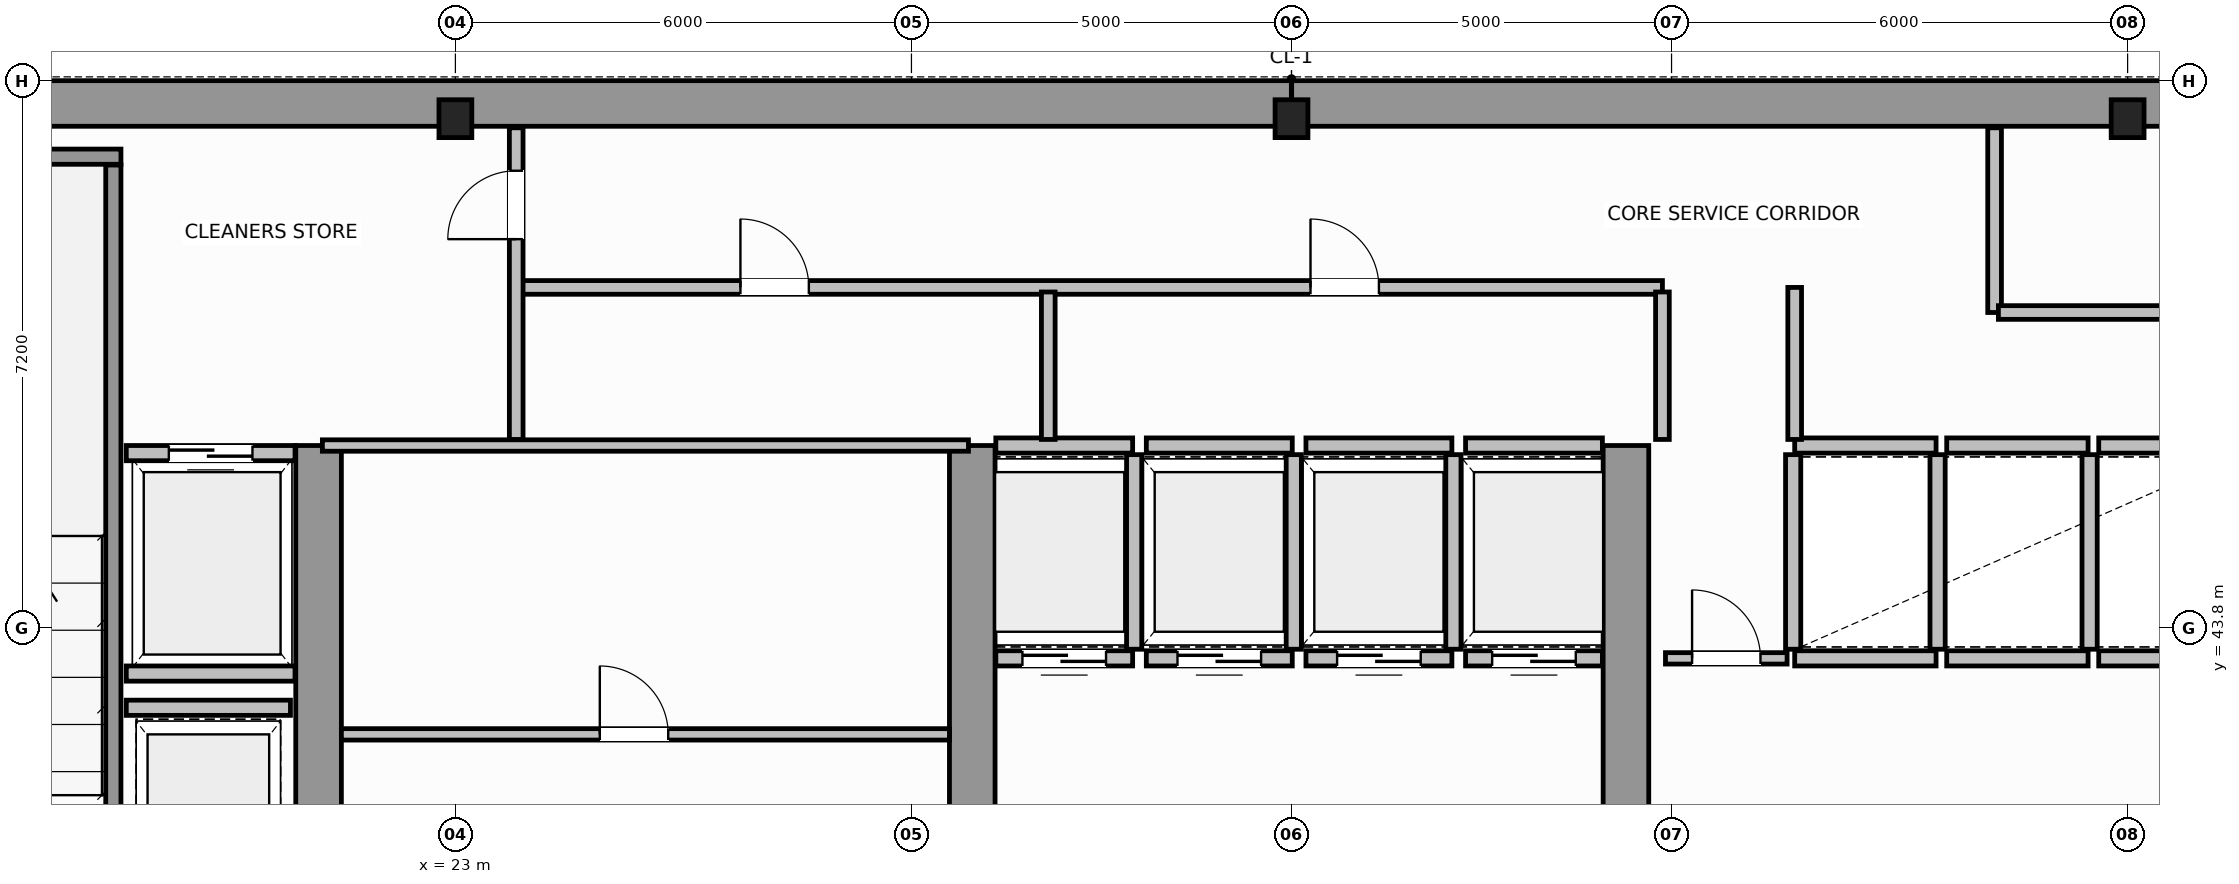
"""IFC4 building model, lengths in metres.
Left out: names, types, materials, properties, quantities, classifications, styles, units other than length and angle.
Written with IfcOpenShell. Run it as: python <this file> out.ifc"""

import sys

from ifc_helpers import new_model, si_unit, direction, frame, frame_2d, origin, origin_2d, place, context, subcontext, project, spatial, rectangle, i_section, extrude, source, transform, mapped, element, fill, save


model = new_model("IFC4")
c1 = context("Model", 3, precision=1e-05, world=origin(), true_north=direction((0.0, 1.0)))
c2 = subcontext(c1, "Body", "Model", "MODEL_VIEW")
j1 = project(units=[si_unit("LENGTHUNIT", "METRE"), si_unit("PLANEANGLEUNIT", "RADIAN")], contexts=[c1])
p1 = place(None, origin())
s1 = spatial("IfcSite", under=j1, at=p1, CompositionType="ELEMENT")
p2 = place(p1, origin())
s2 = spatial("IfcBuilding", under=s1, at=p2, CompositionType="ELEMENT")
p3 = place(p2, frame((0.0, 0.0, 169.0)))
s3 = spatial("IfcBuildingStorey", under=s2, at=p3, CompositionType="ELEMENT", Elevation=169.0)
m1 = source(origin(), c2, "Body", "SweptSolid", [
    extrude(i_section(OverallWidth=0.432, OverallDepth=0.498, WebThickness=0.055, FlangeThickness=0.068, FilletRadius=0.015, at=origin_2d()), origin(), (0.0, 0.0, 1.0), 3.8),
])
for number, where, z_axis, x_axis in (
    (1, (23.0, 50.5, 0.0), (0.0, 0.0, 1.0), (1.0, 0.0, 0.0)),
    (2, (34.0, 50.5, 0.0), (0.0, 0.0, 1.0), (1.0, 0.0, 0.0)),
    (3, (45.0, 50.5, 0.0), (0.0, 0.0, 1.0), (1.0, 0.0, 0.0)),
):
    element("IfcColumn", number, at=place(p3, frame(where, z_axis=z_axis, x_axis=x_axis)), inside=s3, PredefinedType="COLUMN", context=c2, shape_type="MappedRepresentation", body=[
        mapped(m1, transform((0.0, 0.0, 0.0), scale=1.0)),
    ])
for number, where, z_axis, x_axis in (
    (4, (14.304, 50.7, 0.0), (0.0, 0.0, 1.0), (1.0, 0.0, 0.0)),
    (5, (34.002, 50.7, 0.0), (0.0, 0.0, 1.0), (1.0, 0.0, 0.0)),
):
    element("IfcWall", number, at=place(p3, frame(where, z_axis=z_axis, x_axis=x_axis)), inside=s3, PredefinedType="SHEAR", context=c2, shape_type="SweptSolid", body=[
        extrude(rectangle(XDim=19.694, YDim=0.6, at=frame_2d((9.847, 0.0))), origin(), (0.0, 0.0, 1.0), 3.8),
    ])
for number, where, z_axis, x_axis in (
    (6, (21.2, 36.82, 0.0), (0.0, 0.0, 1.0), (0.0, 1.0, 0.0)),
    (7, (29.8, 36.82, 0.0), (0.0, 0.0, 1.0), (0.0, 1.0, 0.0)),
    (8, (38.4, 36.82, 0.0), (0.0, 0.0, 1.0), (0.0, 1.0, 0.0)),
):
    element("IfcWall", number, at=place(p3, frame(where, z_axis=z_axis, x_axis=x_axis)), inside=s3, PredefinedType="SHEAR", context=c2, shape_type="SweptSolid", body=[
        extrude(rectangle(XDim=9.38, YDim=0.6, at=frame_2d((4.69, 0.0))), origin(), (0.0, 0.0, 1.0), 3.8),
    ])
p4 = place(p3, frame((14.3, 50.0, 0.0), z_axis=(0.0, 0.0, 1.0), x_axis=(1.0, 0.0, 0.0)))
e9 = element("IfcWall", 9, at=p4, inside=s3, PredefinedType="SOLIDWALL", context=c2, shape_type="SweptSolid", body=[
    extrude(rectangle(XDim=4.3, YDim=0.2, at=frame_2d((2.15, 0.0))), origin(), (0.0, 0.0, 1.0), 3.8),
])
p5 = place(p3, frame((18.5, 39.96, 0.0), z_axis=(0.0, 0.0, 1.0), x_axis=(0.0, 1.0, 0.0)))
e10 = element("IfcWall", 10, at=p5, inside=s3, PredefinedType="SOLIDWALL", context=c2, shape_type="SweptSolid", body=[
    extrude(rectangle(XDim=9.93, YDim=0.2, at=frame_2d((4.965, 0.0))), origin(), (0.0, 0.0, 1.0), 3.8),
])
p6 = place(p3, frame((30.11, 43.4, 0.0), z_axis=(0.0, 0.0, 1.0), x_axis=(1.0, 0.0, 0.0)))
e11 = element("IfcWall", 11, at=p6, inside=s3, PredefinedType="SOLIDWALL", context=c2, shape_type="SweptSolid", body=[
    extrude(rectangle(XDim=1.8, YDim=0.2, at=frame_2d((0.9, 0.0))), origin(), (0.0, 0.0, 1.0), 3.58),
])
p7 = place(p6, frame((0.35, 0.0, 0.0)))
e12 = element("IfcOpeningElement", 12, at=p7, cuts=e11, PredefinedType="OPENING", context=c2, shape_type="SweptSolid", body=[
    extrude(rectangle(XDim=1.1, YDim=2.15, at=frame_2d((0.55, 1.075))), frame((0.0, 0.11, 0.0), z_axis=(0.0, -1.0, 0.0), x_axis=(1.0, 0.0, 0.0)), (0.0, 0.0, 1.0), 0.22),
])
p8 = place(p3, frame((30.11, 46.2, 0.0), z_axis=(0.0, 0.0, 1.0), x_axis=(1.0, 0.0, 0.0)))
e13 = element("IfcWall", 13, at=p8, inside=s3, PredefinedType="SOLIDWALL", context=c2, shape_type="SweptSolid", body=[
    extrude(rectangle(XDim=1.8, YDim=0.2, at=frame_2d((0.9, 0.0))), origin(), (0.0, 0.0, 1.0), 3.58),
])
p9 = place(p3, frame((31.93, 43.52, 0.0), z_axis=(0.0, 0.0, 1.0), x_axis=(0.0, 1.0, 0.0)))
e14 = element("IfcWall", 14, at=p9, inside=s3, PredefinedType="SOLIDWALL", context=c2, shape_type="SweptSolid", body=[
    extrude(rectangle(XDim=2.56, YDim=0.2, at=frame_2d((1.28, 0.0))), origin(), (0.0, 0.0, 1.0), 3.58),
])
p10 = place(p3, frame((32.09, 43.4, 0.0), z_axis=(0.0, 0.0, 1.0), x_axis=(1.0, 0.0, 0.0)))
e15 = element("IfcWall", 15, at=p10, inside=s3, PredefinedType="SOLIDWALL", context=c2, shape_type="SweptSolid", body=[
    extrude(rectangle(XDim=1.92, YDim=0.2, at=frame_2d((0.96, 0.0))), origin(), (0.0, 0.0, 1.0), 3.58),
])
p11 = place(p10, frame((0.41, 0.0, 0.0)))
e16 = element("IfcOpeningElement", 16, at=p11, cuts=e15, PredefinedType="OPENING", context=c2, shape_type="SweptSolid", body=[
    extrude(rectangle(XDim=1.1, YDim=2.15, at=frame_2d((0.55, 1.075))), frame((0.0, 0.11, 0.0), z_axis=(0.0, -1.0, 0.0), x_axis=(1.0, 0.0, 0.0)), (0.0, 0.0, 1.0), 0.22),
])
p12 = place(p3, frame((32.09, 46.2, 0.0), z_axis=(0.0, 0.0, 1.0), x_axis=(1.0, 0.0, 0.0)))
e17 = element("IfcWall", 17, at=p12, inside=s3, PredefinedType="SOLIDWALL", context=c2, shape_type="SweptSolid", body=[
    extrude(rectangle(XDim=1.92, YDim=0.2, at=frame_2d((0.96, 0.0))), origin(), (0.0, 0.0, 1.0), 3.58),
])
p13 = place(p3, frame((34.03, 43.52, 0.0), z_axis=(0.0, 0.0, 1.0), x_axis=(0.0, 1.0, 0.0)))
e18 = element("IfcWall", 18, at=p13, inside=s3, PredefinedType="SOLIDWALL", context=c2, shape_type="SweptSolid", body=[
    extrude(rectangle(XDim=2.56, YDim=0.2, at=frame_2d((1.28, 0.0))), origin(), (0.0, 0.0, 1.0), 3.58),
])
p14 = place(p3, frame((34.19, 43.4, 0.0), z_axis=(0.0, 0.0, 1.0), x_axis=(1.0, 0.0, 0.0)))
e19 = element("IfcWall", 19, at=p14, inside=s3, PredefinedType="SOLIDWALL", context=c2, shape_type="SweptSolid", body=[
    extrude(rectangle(XDim=1.92, YDim=0.2, at=frame_2d((0.96, 0.0))), origin(), (0.0, 0.0, 1.0), 3.58),
])
p15 = place(p14, frame((0.41, 0.0, 0.0)))
e20 = element("IfcOpeningElement", 20, at=p15, cuts=e19, PredefinedType="OPENING", context=c2, shape_type="SweptSolid", body=[
    extrude(rectangle(XDim=1.1, YDim=2.15, at=frame_2d((0.55, 1.075))), frame((0.0, 0.11, 0.0), z_axis=(0.0, -1.0, 0.0), x_axis=(1.0, 0.0, 0.0)), (0.0, 0.0, 1.0), 0.22),
])
p16 = place(p3, frame((34.19, 46.2, 0.0), z_axis=(0.0, 0.0, 1.0), x_axis=(1.0, 0.0, 0.0)))
e21 = element("IfcWall", 21, at=p16, inside=s3, PredefinedType="SOLIDWALL", context=c2, shape_type="SweptSolid", body=[
    extrude(rectangle(XDim=1.92, YDim=0.2, at=frame_2d((0.96, 0.0))), origin(), (0.0, 0.0, 1.0), 3.58),
])
p17 = place(p3, frame((36.13, 43.52, 0.0), z_axis=(0.0, 0.0, 1.0), x_axis=(0.0, 1.0, 0.0)))
e22 = element("IfcWall", 22, at=p17, inside=s3, PredefinedType="SOLIDWALL", context=c2, shape_type="SweptSolid", body=[
    extrude(rectangle(XDim=2.56, YDim=0.2, at=frame_2d((1.28, 0.0))), origin(), (0.0, 0.0, 1.0), 3.58),
])
p18 = place(p3, frame((36.29, 43.4, 0.0), z_axis=(0.0, 0.0, 1.0), x_axis=(1.0, 0.0, 0.0)))
e23 = element("IfcWall", 23, at=p18, inside=s3, PredefinedType="SOLIDWALL", context=c2, shape_type="SweptSolid", body=[
    extrude(rectangle(XDim=1.8, YDim=0.2, at=frame_2d((0.9, 0.0))), origin(), (0.0, 0.0, 1.0), 3.58),
])
p19 = place(p18, frame((0.35, 0.0, 0.0)))
e24 = element("IfcOpeningElement", 24, at=p19, cuts=e23, PredefinedType="OPENING", context=c2, shape_type="SweptSolid", body=[
    extrude(rectangle(XDim=1.1, YDim=2.15, at=frame_2d((0.55, 1.075))), frame((0.0, 0.11, 0.0), z_axis=(0.0, -1.0, 0.0), x_axis=(1.0, 0.0, 0.0)), (0.0, 0.0, 1.0), 0.22),
])
p20 = place(p3, frame((36.29, 46.2, 0.0), z_axis=(0.0, 0.0, 1.0), x_axis=(1.0, 0.0, 0.0)))
e25 = element("IfcWall", 25, at=p20, inside=s3, PredefinedType="SOLIDWALL", context=c2, shape_type="SweptSolid", body=[
    extrude(rectangle(XDim=1.8, YDim=0.2, at=frame_2d((0.9, 0.0))), origin(), (0.0, 0.0, 1.0), 3.58),
])
for number, where, z_axis, x_axis in (
    (26, (40.62, 43.4, 0.0), (0.0, 0.0, 1.0), (1.0, 0.0, 0.0)),
    (27, (40.62, 46.2, 0.0), (0.0, 0.0, 1.0), (1.0, 0.0, 0.0)),
):
    element("IfcWall", number, at=place(p3, frame(where, z_axis=z_axis, x_axis=x_axis)), inside=s3, PredefinedType="SOLIDWALL", context=c2, shape_type="SweptSolid", body=[
        extrude(rectangle(XDim=1.86, YDim=0.2, at=frame_2d((0.93, 0.0))), origin(), (0.0, 0.0, 1.0), 3.58),
    ])
for number, where, z_axis, x_axis in (
    (28, (40.6, 43.52, 0.0), (0.0, 0.0, 1.0), (0.0, 1.0, 0.0)),
    (29, (42.5, 43.52, 0.0), (0.0, 0.0, 1.0), (0.0, 1.0, 0.0)),
):
    element("IfcWall", number, at=place(p3, frame(where, z_axis=z_axis, x_axis=x_axis)), inside=s3, PredefinedType="SOLIDWALL", context=c2, shape_type="SweptSolid", body=[
        extrude(rectangle(XDim=2.56, YDim=0.2, at=frame_2d((1.28, 0.0))), origin(), (0.0, 0.0, 1.0), 3.58),
    ])
for number, where, z_axis, x_axis in (
    (30, (42.62, 43.4, 0.0), (0.0, 0.0, 1.0), (1.0, 0.0, 0.0)),
    (31, (42.62, 46.2, 0.0), (0.0, 0.0, 1.0), (1.0, 0.0, 0.0)),
):
    element("IfcWall", number, at=place(p3, frame(where, z_axis=z_axis, x_axis=x_axis)), inside=s3, PredefinedType="SOLIDWALL", context=c2, shape_type="SweptSolid", body=[
        extrude(rectangle(XDim=1.86, YDim=0.2, at=frame_2d((0.93, 0.0))), origin(), (0.0, 0.0, 1.0), 3.58),
    ])
p21 = place(p3, frame((44.5, 43.52, 0.0), z_axis=(0.0, 0.0, 1.0), x_axis=(0.0, 1.0, 0.0)))
e32 = element("IfcWall", 32, at=p21, inside=s3, PredefinedType="SOLIDWALL", context=c2, shape_type="SweptSolid", body=[
    extrude(rectangle(XDim=2.56, YDim=0.2, at=frame_2d((1.28, 0.0))), origin(), (0.0, 0.0, 1.0), 3.58),
])
for number, where, z_axis, x_axis in (
    (33, (44.62, 43.4, 0.0), (0.0, 0.0, 1.0), (1.0, 0.0, 0.0)),
    (34, (44.62, 46.2, 0.0), (0.0, 0.0, 1.0), (1.0, 0.0, 0.0)),
):
    element("IfcWall", number, at=place(p3, frame(where, z_axis=z_axis, x_axis=x_axis)), inside=s3, PredefinedType="SOLIDWALL", context=c2, shape_type="SweptSolid", body=[
        extrude(rectangle(XDim=1.86, YDim=0.2, at=frame_2d((0.93, 0.0))), origin(), (0.0, 0.0, 1.0), 3.58),
    ])
p22 = place(p3, frame((18.67, 46.1, 0.0), z_axis=(0.0, 0.0, 1.0), x_axis=(1.0, 0.0, 0.0)))
e35 = element("IfcWall", 35, at=p22, inside=s3, PredefinedType="SOLIDWALL", context=c2, shape_type="SweptSolid", body=[
    extrude(rectangle(XDim=2.22, YDim=0.2, at=frame_2d((1.11, 0.0))), origin(), (0.0, 0.0, 1.0), 3.58),
])
p23 = place(p22, frame((0.56, 0.0, 0.0)))
e36 = element("IfcOpeningElement", 36, at=p23, cuts=e35, PredefinedType="OPENING", context=c2, shape_type="SweptSolid", body=[
    extrude(rectangle(XDim=1.1, YDim=2.15, at=frame_2d((0.55, 1.075))), frame((0.0, 0.11, 0.0), z_axis=(0.0, -1.0, 0.0), x_axis=(1.0, 0.0, 0.0)), (0.0, 0.0, 1.0), 0.22),
])
p24 = place(p3, frame((18.67, 43.2, 0.0), z_axis=(0.0, 0.0, 1.0), x_axis=(1.0, 0.0, 0.0)))
e37 = element("IfcWall", 37, at=p24, inside=s3, PredefinedType="SOLIDWALL", context=c2, shape_type="SweptSolid", body=[
    extrude(rectangle(XDim=2.22, YDim=0.2, at=frame_2d((1.11, 0.0))), origin(), (0.0, 0.0, 1.0), 3.58),
])
p25 = place(p3, frame((18.67, 42.75, 0.0), z_axis=(0.0, 0.0, 1.0), x_axis=(1.0, 0.0, 0.0)))
e38 = element("IfcWall", 38, at=p25, inside=s3, PredefinedType="SOLIDWALL", context=c2, shape_type="SweptSolid", body=[
    extrude(rectangle(XDim=2.16, YDim=0.2, at=frame_2d((1.08, 0.0))), origin(), (0.0, 0.0, 1.0), 3.58),
])
p26 = place(p3, frame((21.25, 46.2, 0.0), z_axis=(0.0, 0.0, 1.0), x_axis=(1.0, 0.0, 0.0)))
e39 = element("IfcWall", 39, at=p26, inside=s3, PredefinedType="PARTITIONING", context=c2, shape_type="SweptSolid", body=[
    extrude(rectangle(XDim=8.5, YDim=0.15, at=frame_2d((4.25, 0.0))), origin(), (0.0, 0.0, 1.0), 3.58),
])
p27 = place(p3, frame((21.5, 42.4, 0.0), z_axis=(0.0, 0.0, 1.0), x_axis=(1.0, 0.0, 0.0)))
e40 = element("IfcWall", 40, at=p27, inside=s3, PredefinedType="PARTITIONING", context=c2, shape_type="SweptSolid", body=[
    extrude(rectangle(XDim=8.0, YDim=0.15, at=frame_2d((4.0, 0.0))), origin(), (0.0, 0.0, 1.0), 3.58),
])
p28 = place(p27, frame((3.4, 0.0, 0.0)))
e41 = element("IfcOpeningElement", 41, at=p28, cuts=e40, PredefinedType="OPENING", context=c2, shape_type="SweptSolid", body=[
    extrude(rectangle(XDim=0.9, YDim=2.1, at=frame_2d((0.45, 1.05))), frame((0.0, 0.085, 0.0), z_axis=(0.0, -1.0, 0.0), x_axis=(1.0, 0.0, 0.0)), (0.0, 0.0, 1.0), 0.17),
])
p29 = place(p3, frame((38.92, 43.4, 0.0), z_axis=(0.0, 0.0, 1.0), x_axis=(1.0, 0.0, 0.0)))
e42 = element("IfcWall", 42, at=p29, inside=s3, PredefinedType="PARTITIONING", context=c2, shape_type="SweptSolid", body=[
    extrude(rectangle(XDim=1.6, YDim=0.15, at=frame_2d((0.8, 0.0))), origin(), (0.0, 0.0, 1.0), 3.58),
])
p30 = place(p29, frame((0.35, 0.0, 0.0)))
e43 = element("IfcOpeningElement", 43, at=p30, cuts=e42, PredefinedType="OPENING", context=c2, shape_type="SweptSolid", body=[
    extrude(rectangle(XDim=0.9, YDim=2.1, at=frame_2d((0.45, 1.05))), frame((0.0, 0.085, 0.0), z_axis=(0.0, -1.0, 0.0), x_axis=(1.0, 0.0, 0.0)), (0.0, 0.0, 1.0), 0.17),
])
p31 = place(p3, frame((23.85, 48.28, 0.0), z_axis=(0.0, 0.0, 1.0), x_axis=(1.0, 0.0, 0.0)))
e44 = element("IfcWall", 44, at=p31, inside=s3, PredefinedType="PLUMBINGWALL", context=c2, shape_type="SweptSolid", body=[
    extrude(rectangle(XDim=15.03, YDim=0.18, at=frame_2d((7.515, 0.0))), origin(), (0.0, 0.0, 1.0), 3.58),
])
p32 = place(p31, frame((2.9, 0.0, 0.0)))
e45 = element("IfcOpeningElement", 45, at=p32, cuts=e44, PredefinedType="OPENING", context=c2, shape_type="SweptSolid", body=[
    extrude(rectangle(XDim=0.9, YDim=2.15, at=frame_2d((0.45, 1.075))), frame((0.0, 0.1, 0.0), z_axis=(0.0, -1.0, 0.0), x_axis=(1.0, 0.0, 0.0)), (0.0, 0.0, 1.0), 0.2),
])
p33 = place(p31, frame((10.4, 0.0, 0.0)))
e46 = element("IfcOpeningElement", 46, at=p33, cuts=e44, PredefinedType="OPENING", context=c2, shape_type="SweptSolid", body=[
    extrude(rectangle(XDim=0.9, YDim=2.15, at=frame_2d((0.45, 1.075))), frame((0.0, 0.1, 0.0), z_axis=(0.0, -1.0, 0.0), x_axis=(1.0, 0.0, 0.0)), (0.0, 0.0, 1.0), 0.2),
])
p34 = place(p3, frame((23.8, 46.28, 0.0), z_axis=(0.0, 0.0, 1.0), x_axis=(0.0, 1.0, 0.0)))
e47 = element("IfcWall", 47, at=p34, inside=s3, PredefinedType="PLUMBINGWALL", context=c2, shape_type="SweptSolid", body=[
    extrude(rectangle(XDim=4.1, YDim=0.18, at=frame_2d((2.05, 0.0))), origin(), (0.0, 0.0, 1.0), 3.58),
])
p35 = place(p34, frame((2.635, 0.0, 0.0)))
e48 = element("IfcOpeningElement", 48, at=p35, cuts=e47, PredefinedType="OPENING", context=c2, shape_type="SweptSolid", body=[
    extrude(rectangle(XDim=0.9, YDim=2.15, at=frame_2d((0.45, 1.075))), frame((0.0, 0.1, 0.0), z_axis=(0.0, -1.0, 0.0), x_axis=(1.0, 0.0, 0.0)), (0.0, 0.0, 1.0), 0.2),
])
for number, where, z_axis, x_axis in (
    (49, (30.8, 46.28, 0.0), (0.0, 0.0, 1.0), (0.0, 1.0, 0.0)),
    (50, (38.88, 46.28, 0.0), (0.0, 0.0, 1.0), (0.0, 1.0, 0.0)),
):
    element("IfcWall", number, at=place(p3, frame(where, z_axis=z_axis, x_axis=x_axis)), inside=s3, PredefinedType="PLUMBINGWALL", context=c2, shape_type="SweptSolid", body=[
        extrude(rectangle(XDim=1.94, YDim=0.18, at=frame_2d((0.97, 0.0))), origin(), (0.0, 0.0, 1.0), 3.58),
    ])
p36 = place(p3, frame((40.62, 46.28, 0.0), z_axis=(0.0, 0.0, 1.0), x_axis=(0.0, 1.0, 0.0)))
e51 = element("IfcWall", 51, at=p36, inside=s3, PredefinedType="PLUMBINGWALL", context=c2, shape_type="SweptSolid", body=[
    extrude(rectangle(XDim=2.0, YDim=0.18, at=frame_2d((1.0, 0.0))), origin(), (0.0, 0.0, 1.0), 3.58),
])
p37 = place(p3, frame((43.25, 47.95, 0.0), z_axis=(0.0, 0.0, 1.0), x_axis=(0.0, 1.0, 0.0)))
e52 = element("IfcWall", 52, at=p37, inside=s3, PredefinedType="PLUMBINGWALL", context=c2, shape_type="SweptSolid", body=[
    extrude(rectangle(XDim=2.43, YDim=0.18, at=frame_2d((1.215, 0.0))), origin(), (0.0, 0.0, 1.0), 3.58),
])
p38 = place(p3, frame((43.3, 47.95, 0.0), z_axis=(0.0, 0.0, 1.0), x_axis=(1.0, 0.0, 0.0)))
e53 = element("IfcWall", 53, at=p38, inside=s3, PredefinedType="PLUMBINGWALL", context=c2, shape_type="SweptSolid", body=[
    extrude(rectangle(XDim=6.08, YDim=0.18, at=frame_2d((3.04, 0.0))), origin(), (0.0, 0.0, 1.0), 3.58),
])
p39 = place(p38, frame((2.4, 0.0, 0.0)))
e54 = element("IfcOpeningElement", 54, at=p39, cuts=e53, PredefinedType="OPENING", context=c2, shape_type="SweptSolid", body=[
    extrude(rectangle(XDim=0.9, YDim=2.15, at=frame_2d((0.45, 1.075))), frame((0.0, 0.1, 0.0), z_axis=(0.0, -1.0, 0.0), x_axis=(1.0, 0.0, 0.0)), (0.0, 0.0, 1.0), 0.2),
])
m2 = source(origin(), c2, "Body", "SweptSolid", [
    extrude(rectangle(XDim=1.1, YDim=2.15, at=frame_2d((0.55, 1.075))), frame((0.0, 0.025, 0.0), z_axis=(0.0, -1.0, 0.0), x_axis=(1.0, 0.0, 0.0)), (0.0, 0.0, 1.0), 0.05),
])
p40 = place(p7, origin())
e55 = element("IfcDoor", 55, at=p40, inside=s3, OperationType="DOUBLE_DOOR_SLIDING", PredefinedType="DOOR", context=c2, shape_type="MappedRepresentation", body=[
    mapped(m2, transform((0.0, 0.0, 0.0), scale=1.0)),
])
fill(e12, e55)
p41 = place(p11, origin())
e56 = element("IfcDoor", 56, at=p41, inside=s3, OperationType="DOUBLE_DOOR_SLIDING", PredefinedType="DOOR", context=c2, shape_type="MappedRepresentation", body=[
    mapped(m2, transform((0.0, 0.0, 0.0), scale=1.0)),
])
fill(e16, e56)
p42 = place(p15, origin())
e57 = element("IfcDoor", 57, at=p42, inside=s3, OperationType="DOUBLE_DOOR_SLIDING", PredefinedType="DOOR", context=c2, shape_type="MappedRepresentation", body=[
    mapped(m2, transform((0.0, 0.0, 0.0), scale=1.0)),
])
fill(e20, e57)
p43 = place(p19, origin())
e58 = element("IfcDoor", 58, at=p43, inside=s3, OperationType="DOUBLE_DOOR_SLIDING", PredefinedType="DOOR", context=c2, shape_type="MappedRepresentation", body=[
    mapped(m2, transform((0.0, 0.0, 0.0), scale=1.0)),
])
fill(e24, e58)
p44 = place(p23, origin())
e59 = element("IfcDoor", 59, at=p44, inside=s3, OperationType="DOUBLE_DOOR_SLIDING", PredefinedType="DOOR", context=c2, shape_type="MappedRepresentation", body=[
    mapped(m2, transform((0.0, 0.0, 0.0), scale=1.0)),
])
fill(e36, e59)
m3 = source(origin(), c2, "Body", "SweptSolid", [
    extrude(rectangle(XDim=0.9, YDim=2.1, at=frame_2d((0.45, 1.05))), frame((0.0, 0.025, 0.0), z_axis=(0.0, -1.0, 0.0), x_axis=(1.0, 0.0, 0.0)), (0.0, 0.0, 1.0), 0.05),
])
p45 = place(p28, origin())
e60 = element("IfcDoor", 60, at=p45, inside=s3, OperationType="SINGLE_SWING_RIGHT", PredefinedType="DOOR", context=c2, shape_type="MappedRepresentation", body=[
    mapped(m3, transform((0.0, 0.0, 0.0), scale=1.0)),
])
fill(e41, e60)
p46 = place(p30, origin())
e61 = element("IfcDoor", 61, at=p46, inside=s3, OperationType="SINGLE_SWING_LEFT", PredefinedType="DOOR", context=c2, shape_type="MappedRepresentation", body=[
    mapped(m3, transform((0.0, 0.0, 0.0), scale=1.0)),
])
fill(e43, e61)
m4 = source(origin(), c2, "Body", "SweptSolid", [
    extrude(rectangle(XDim=0.9, YDim=2.15, at=frame_2d((0.45, 1.075))), frame((0.0, 0.025, 0.0), z_axis=(0.0, -1.0, 0.0), x_axis=(1.0, 0.0, 0.0)), (0.0, 0.0, 1.0), 0.05),
])
p47 = place(p35, origin())
e62 = element("IfcDoor", 62, at=p47, inside=s3, OperationType="SINGLE_SWING_LEFT", PredefinedType="DOOR", context=c2, shape_type="MappedRepresentation", body=[
    mapped(m4, transform((0.0, 0.0, 0.0), scale=1.0)),
])
fill(e48, e62)
p48 = place(p32, origin())
e63 = element("IfcDoor", 63, at=p48, inside=s3, OperationType="SINGLE_SWING_RIGHT", PredefinedType="DOOR", context=c2, shape_type="MappedRepresentation", body=[
    mapped(m4, transform((0.0, 0.0, 0.0), scale=1.0)),
])
fill(e45, e63)
p49 = place(p33, origin())
e64 = element("IfcDoor", 64, at=p49, inside=s3, OperationType="SINGLE_SWING_LEFT", PredefinedType="DOOR", context=c2, shape_type="MappedRepresentation", body=[
    mapped(m4, transform((0.0, 0.0, 0.0), scale=1.0)),
])
fill(e46, e64)
save(model, sys.argv[1])
